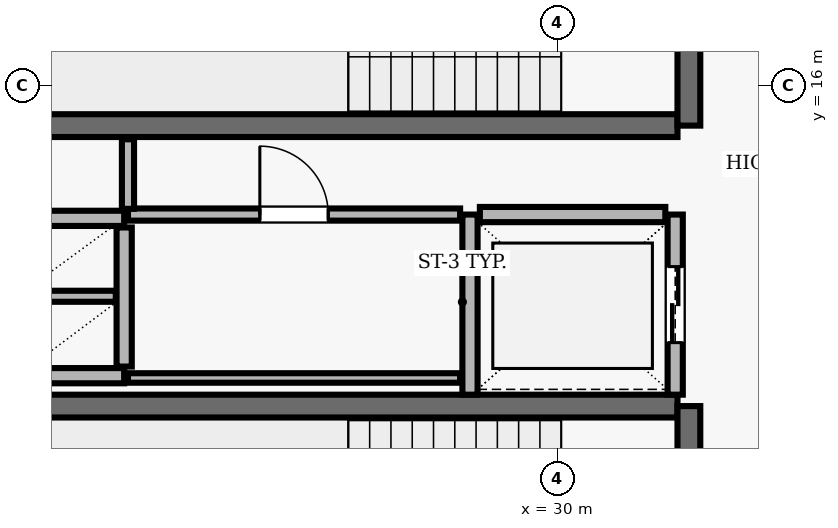
"""IFC4 building model, lengths in metres.
Left out: names, types, materials, properties, quantities, classifications, styles, units other than length and angle.
Written with IfcOpenShell. Run it as: python <this file> out.ifc"""

import sys

from ifc_helpers import new_model, si_unit, direction, frame, frame_2d, origin, place, context, subcontext, project, spatial, rectangle, extrude, element, fill, save


model = new_model("IFC4")
c1 = context("Model", 3, precision=1e-05, world=origin(), true_north=direction((0.0, 1.0)))
c2 = subcontext(c1, "Body", "Model", "MODEL_VIEW")
j1 = project(units=[si_unit("LENGTHUNIT", "METRE"), si_unit("PLANEANGLEUNIT", "RADIAN")], contexts=[c1])
p1 = place(None, origin())
s1 = spatial("IfcSite", under=j1, at=p1, CompositionType="ELEMENT")
p2 = place(p1, origin())
s2 = spatial("IfcBuilding", under=s1, at=p2, CompositionType="ELEMENT")
p3 = place(p2, frame((0.0, 0.0, 179.7)))
s3 = spatial("IfcBuildingStorey", under=s2, at=p3, CompositionType="ELEMENT", Elevation=179.7)
p4 = place(p3, frame((23.22, 15.47, 0.0), z_axis=(0.0, 0.0, 1.0), x_axis=(1.0, 0.0, 0.0)))
e1 = element("IfcWall", 1, at=p4, inside=s3, PredefinedType="SHEAR", context=c2, shape_type="SweptSolid", body=[
    extrude(rectangle(XDim=8.36, YDim=0.3, at=frame_2d((4.18, 0.0))), origin(), (0.0, 0.0, 1.0), 3.69),
])
p5 = place(p3, frame((31.73, 15.47, 0.0), z_axis=(0.0, 0.0, 1.0), x_axis=(0.0, 1.0, 0.0)))
e2 = element("IfcWall", 2, at=p5, inside=s3, PredefinedType="SHEAR", context=c2, shape_type="SweptSolid", body=[
    extrude(rectangle(XDim=3.51, YDim=0.3, at=frame_2d((1.755, 0.0))), origin(), (0.0, 0.0, 1.0), 3.69),
])
p6 = place(p5, frame((1.18, 0.0, 0.0)))
e3 = element("IfcOpeningElement", 3, at=p6, cuts=e2, PredefinedType="OPENING", context=c2, shape_type="SweptSolid", body=[
    extrude(rectangle(XDim=1.15, YDim=2.15, at=frame_2d((0.575, 1.075))), frame((0.0, 0.16, 0.0), z_axis=(0.0, -1.0, 0.0), x_axis=(1.0, 0.0, 0.0)), (0.0, 0.0, 1.0), 0.32),
])
p7 = place(p3, frame((31.58, 11.78, 0.0), z_axis=(0.0, 0.0, 1.0), x_axis=(-1.0, 0.0, 0.0)))
e4 = element("IfcWall", 4, at=p7, inside=s3, PredefinedType="SHEAR", context=c2, shape_type="SweptSolid", body=[
    extrude(rectangle(XDim=8.36, YDim=0.3, at=frame_2d((4.18, 0.0))), origin(), (0.0, 0.0, 1.0), 3.69),
])
p8 = place(p3, frame((31.73, 8.27, 0.0), z_axis=(0.0, 0.0, 1.0), x_axis=(0.0, 1.0, 0.0)))
e5 = element("IfcWall", 5, at=p8, inside=s3, PredefinedType="SHEAR", context=c2, shape_type="SweptSolid", body=[
    extrude(rectangle(XDim=3.51, YDim=0.3, at=frame_2d((1.755, 0.0))), origin(), (0.0, 0.0, 1.0), 3.69),
])
p9 = place(p8, frame((1.18, 0.0, 0.0)))
e6 = element("IfcOpeningElement", 6, at=p9, cuts=e5, PredefinedType="OPENING", context=c2, shape_type="SweptSolid", body=[
    extrude(rectangle(XDim=1.15, YDim=2.15, at=frame_2d((0.575, 1.075))), frame((0.0, 0.16, 0.0), z_axis=(0.0, -1.0, 0.0), x_axis=(1.0, 0.0, 0.0)), (0.0, 0.0, 1.0), 0.32),
])
p10 = place(p3, frame((28.85, 14.3, 0.0), z_axis=(0.0, 0.0, 1.0), x_axis=(0.0, -1.0, 0.0)))
e7 = element("IfcWall", 7, at=p10, inside=s3, PredefinedType="SOLIDWALL", context=c2, shape_type="SweptSolid", body=[
    extrude(rectangle(XDim=2.37, YDim=0.2, at=frame_2d((1.185, 0.0))), origin(), (0.0, 0.0, 1.0), 3.69),
])
p11 = place(p3, frame((31.55, 11.93, 0.0), z_axis=(0.0, 0.0, 1.0), x_axis=(0.0, 1.0, 0.0)))
e8 = element("IfcWall", 8, at=p11, inside=s3, PredefinedType="SOLIDWALL", context=c2, shape_type="SweptSolid", body=[
    extrude(rectangle(XDim=2.37, YDim=0.2, at=frame_2d((1.185, 0.0))), origin(), (0.0, 0.0, 1.0), 3.69),
])
p12 = place(p11, frame((0.685, 0.0, 0.0)))
e9 = element("IfcOpeningElement", 9, at=p12, cuts=e8, PredefinedType="OPENING", context=c2, shape_type="SweptSolid", body=[
    extrude(rectangle(XDim=1.0, YDim=2.1, at=frame_2d((0.5, 1.05))), frame((0.0, 0.11, 0.0), z_axis=(0.0, -1.0, 0.0), x_axis=(1.0, 0.0, 0.0)), (0.0, 0.0, 1.0), 0.22),
])
p13 = place(p3, frame((31.42, 14.3, 0.0), z_axis=(0.0, 0.0, 1.0), x_axis=(-1.0, 0.0, 0.0)))
e10 = element("IfcWall", 10, at=p13, inside=s3, PredefinedType="SOLIDWALL", context=c2, shape_type="SweptSolid", body=[
    extrude(rectangle(XDim=2.44, YDim=0.2, at=frame_2d((1.22, 0.0))), origin(), (0.0, 0.0, 1.0), 3.69),
])
for number, where, z_axis, x_axis in (
    (11, (22.9, 14.25, 0.0), (0.0, 0.0, 1.0), (1.0, 0.0, 0.0)),
    (12, (22.9, 12.18, 0.0), (0.0, 0.0, 1.0), (1.0, 0.0, 0.0)),
):
    element("IfcWall", number, at=place(p3, frame(where, z_axis=z_axis, x_axis=x_axis)), inside=s3, PredefinedType="SOLIDWALL", context=c2, shape_type="SweptSolid", body=[
        extrude(rectangle(XDim=1.4, YDim=0.2, at=frame_2d((0.7, 0.0))), origin(), (0.0, 0.0, 1.0), 3.69),
    ])
p14 = place(p3, frame((24.3, 12.3, 0.0), z_axis=(0.0, 0.0, 1.0), x_axis=(0.0, 1.0, 0.0)))
e13 = element("IfcWall", 13, at=p14, inside=s3, PredefinedType="SOLIDWALL", context=c2, shape_type="SweptSolid", body=[
    extrude(rectangle(XDim=1.83, YDim=0.2, at=frame_2d((0.915, 0.0))), origin(), (0.0, 0.0, 1.0), 3.69),
])
p15 = place(p3, frame((23.01, 13.225, 0.0), z_axis=(0.0, 0.0, 1.0), x_axis=(1.0, 0.0, 0.0)))
e14 = element("IfcWall", 14, at=p15, inside=s3, PredefinedType="PARTITIONING", context=c2, shape_type="SweptSolid", body=[
    extrude(rectangle(XDim=1.18, YDim=0.145, at=frame_2d((0.59, 0.0))), origin(), (0.0, 0.0, 1.0), 3.69),
])
p16 = place(p3, frame((24.35, 12.15, 0.0), z_axis=(0.0, 0.0, 1.0), x_axis=(1.0, 0.0, 0.0)))
e15 = element("IfcWall", 15, at=p16, inside=s3, PredefinedType="PARTITIONING", context=c2, shape_type="SweptSolid", body=[
    extrude(rectangle(XDim=4.37, YDim=0.125, at=frame_2d((2.185, 0.0))), origin(), (0.0, 0.0, 1.0), 3.69),
])
p17 = place(p3, frame((24.35, 14.3, 0.0), z_axis=(0.0, 0.0, 1.0), x_axis=(1.0, 0.0, 0.0)))
e16 = element("IfcWall", 16, at=p17, inside=s3, PredefinedType="PARTITIONING", context=c2, shape_type="SweptSolid", body=[
    extrude(rectangle(XDim=4.37, YDim=0.16, at=frame_2d((2.185, 0.0))), origin(), (0.0, 0.0, 1.0), 3.69),
])
p18 = place(p17, frame((1.735, 0.0, 0.0)))
e17 = element("IfcOpeningElement", 17, at=p18, cuts=e16, PredefinedType="OPENING", context=c2, shape_type="SweptSolid", body=[
    extrude(rectangle(XDim=0.9, YDim=2.1, at=frame_2d((0.45, 1.05))), frame((0.0, 0.09, 0.0), z_axis=(0.0, -1.0, 0.0), x_axis=(1.0, 0.0, 0.0)), (0.0, 0.0, 1.0), 0.18),
])
p19 = place(p3, frame((24.35, 15.29, 0.0), z_axis=(0.0, 0.0, 1.0), x_axis=(0.0, -1.0, 0.0)))
e18 = element("IfcWall", 18, at=p19, inside=s3, PredefinedType="PARTITIONING", context=c2, shape_type="SweptSolid", body=[
    extrude(rectangle(XDim=0.915, YDim=0.16, at=frame_2d((0.458, 0.0))), origin(), (0.0, 0.0, 1.0), 3.69),
])
p20 = place(p12, origin())
e19 = element("IfcDoor", 19, at=p20, inside=s3, OperationType="DOUBLE_DOOR_SLIDING", PredefinedType="DOOR", context=c2, shape_type="SweptSolid", body=[
    extrude(rectangle(XDim=1.0, YDim=2.1, at=frame_2d((0.5, 1.05))), frame((0.0, 0.025, 0.0), z_axis=(0.0, -1.0, 0.0), x_axis=(1.0, 0.0, 0.0)), (0.0, 0.0, 1.0), 0.05),
])
fill(e9, e19)
p21 = place(p18, origin())
e20 = element("IfcDoor", 20, at=p21, inside=s3, OperationType="SINGLE_SWING_LEFT", PredefinedType="DOOR", context=c2, shape_type="SweptSolid", body=[
    extrude(rectangle(XDim=0.9, YDim=2.1, at=frame_2d((0.45, 1.05))), frame((0.0, 0.025, 0.0), z_axis=(0.0, -1.0, 0.0), x_axis=(1.0, 0.0, 0.0)), (0.0, 0.0, 1.0), 0.05),
])
fill(e17, e20)
save(model, sys.argv[1])
